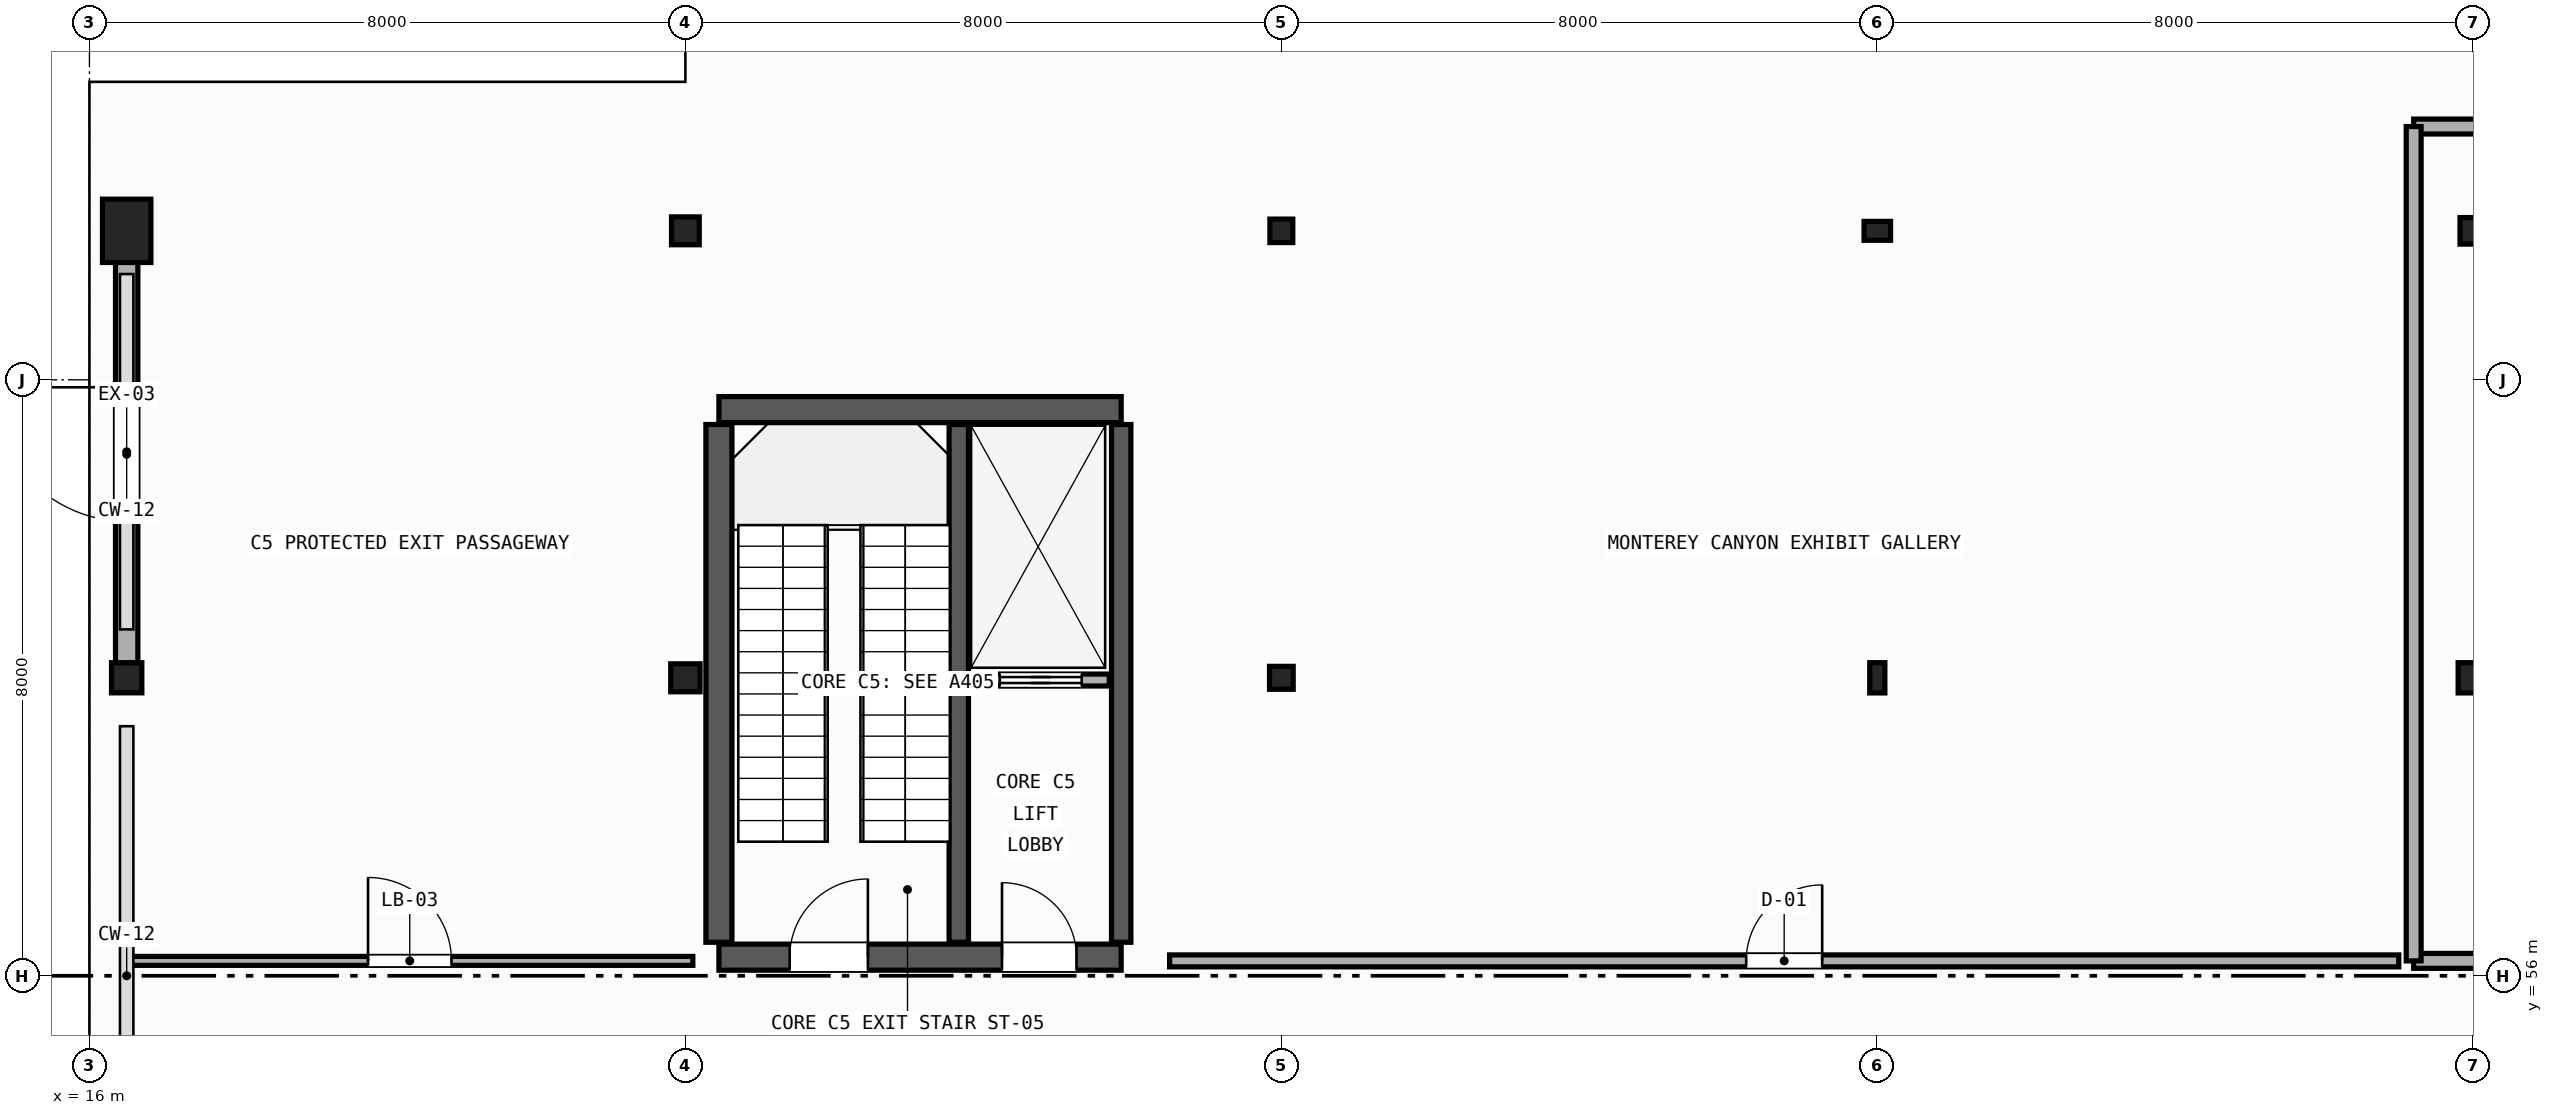
"""IFC4 building model, lengths in metres.
Left out: names, types, materials, properties, quantities, classifications, styles, units other than length and angle.
Written with IfcOpenShell. Run it as: python <this file> out.ifc"""

import sys

from ifc_helpers import new_model, si_unit, direction, frame, frame_2d, origin, origin_2d, place, context, subcontext, project, spatial, rectangle, hollow_rectangle, hollow_circle, i_section, extrude, element, fill, save


model = new_model("IFC4")
c1 = context("Model", 3, precision=1e-05, world=origin(), true_north=direction((0.0, 1.0)))
c2 = subcontext(c1, "Body", "Model", "MODEL_VIEW")
j1 = project(units=[si_unit("LENGTHUNIT", "METRE"), si_unit("PLANEANGLEUNIT", "RADIAN")], contexts=[c1])
p1 = place(None, origin())
s1 = spatial("IfcSite", under=j1, at=p1, CompositionType="ELEMENT")
p2 = place(p1, origin())
s2 = spatial("IfcBuilding", under=s1, at=p2, CompositionType="ELEMENT")
p3 = place(p2, origin())
s3 = spatial("IfcBuildingStorey", under=s2, at=p3, CompositionType="ELEMENT", Elevation=0.0)
p4 = place(p3, frame((16.5, 60.0, 0.0), z_axis=(0.0, 0.0, 1.0), x_axis=(0.0, 1.0, 0.0)))
e1 = element("IfcColumn", 1, at=p4, inside=s3, PredefinedType="COLUMN", context=c2, shape_type="SweptSolid", body=[
    extrude(i_section(OverallWidth=0.404, OverallDepth=0.407, WebThickness=0.027, FlangeThickness=0.044, FilletRadius=0.015, at=origin_2d()), origin(), (0.0, 0.0, 1.0), 5.12),
])
p5 = place(p3, frame((16.5, 66.0, 0.0), z_axis=(0.0, 0.0, 1.0), x_axis=(1.0, 0.0, 0.0)))
e2 = element("IfcColumn", 2, at=p5, inside=s3, PredefinedType="PILASTER", context=c2, shape_type="SweptSolid", body=[
    extrude(rectangle(XDim=0.65, YDim=0.85, at=origin_2d()), origin(), (0.0, 0.0, 1.0), 5.4),
])
p6 = place(p3, frame((24.0, 60.0, 0.0), z_axis=(0.0, 0.0, 1.0), x_axis=(1.0, 0.0, 0.0)))
e3 = element("IfcColumn", 3, at=p6, inside=s3, PredefinedType="COLUMN", context=c2, shape_type="SweptSolid", body=[
    extrude(i_section(OverallWidth=0.394, OverallDepth=0.376, WebThickness=0.017, FlangeThickness=0.028, FilletRadius=0.015, at=origin_2d()), origin(), (0.0, 0.0, 1.0), 5.12),
])
p7 = place(p3, frame((24.0, 66.0, 0.0), z_axis=(0.0, 0.0, 1.0), x_axis=(0.0, 1.0, 0.0)))
e4 = element("IfcColumn", 4, at=p7, inside=s3, PredefinedType="COLUMN", context=c2, shape_type="SweptSolid", body=[
    extrude(i_section(OverallWidth=0.374, OverallDepth=0.372, WebThickness=0.016, FlangeThickness=0.026, FilletRadius=0.015, at=origin_2d()), origin(), (0.0, 0.0, 1.0), 5.12),
])
p8 = place(p3, frame((32.0, 60.0, 0.0), z_axis=(0.0, 0.0, 1.0), x_axis=(0.0, 1.0, 0.0)))
e5 = element("IfcColumn", 5, at=p8, inside=s3, PredefinedType="COLUMN", context=c2, shape_type="SweptSolid", body=[
    extrude(i_section(OverallWidth=0.308, OverallDepth=0.318, WebThickness=0.013, FlangeThickness=0.021, FilletRadius=0.013, at=origin_2d()), origin(), (0.0, 0.0, 1.0), 5.12),
])
p9 = place(p3, frame((32.0, 66.0, 0.0), z_axis=(0.0, 0.0, 1.0), x_axis=(1.0, 0.0, 0.0)))
e6 = element("IfcColumn", 6, at=p9, inside=s3, PredefinedType="COLUMN", context=c2, shape_type="SweptSolid", body=[
    extrude(i_section(OverallWidth=0.307, OverallDepth=0.315, WebThickness=0.012, FlangeThickness=0.019, FilletRadius=0.013, at=origin_2d()), origin(), (0.0, 0.0, 1.0), 5.12),
])
p10 = place(p3, frame((40.0, 60.0, 0.0), z_axis=(0.0, 0.0, 1.0), x_axis=(1.0, 0.0, 0.0)))
e7 = element("IfcColumn", 7, at=p10, inside=s3, PredefinedType="COLUMN", context=c2, shape_type="SweptSolid", body=[
    extrude(hollow_rectangle(XDim=0.203, YDim=0.406, WallThickness=0.012, InnerFilletRadius=0.012, OuterFilletRadius=0.024, at=origin_2d()), origin(), (0.0, 0.0, 1.0), 5.12),
])
p11 = place(p3, frame((40.0, 66.0, 0.0), z_axis=(0.0, 0.0, 1.0), x_axis=(0.0, 1.0, 0.0)))
e8 = element("IfcColumn", 8, at=p11, inside=s3, PredefinedType="COLUMN", context=c2, shape_type="SweptSolid", body=[
    extrude(hollow_rectangle(XDim=0.254, YDim=0.356, WallThickness=0.012, InnerFilletRadius=0.012, OuterFilletRadius=0.024, at=origin_2d()), origin(), (0.0, 0.0, 1.0), 5.12),
])
p12 = place(p3, frame((48.0, 60.0, 0.0), z_axis=(0.0, 0.0, 1.0), x_axis=(0.0, 1.0, 0.0)))
e9 = element("IfcColumn", 9, at=p12, inside=s3, PredefinedType="COLUMN", context=c2, shape_type="SweptSolid", body=[
    extrude(hollow_circle(Radius=0.203, WallThickness=0.012, at=origin_2d()), origin(), (0.0, 0.0, 1.0), 5.12),
])
p13 = place(p3, frame((48.0, 66.0, 0.0), z_axis=(0.0, 0.0, 1.0), x_axis=(1.0, 0.0, 0.0)))
e10 = element("IfcColumn", 10, at=p13, inside=s3, PredefinedType="COLUMN", context=c2, shape_type="SweptSolid", body=[
    extrude(hollow_circle(Radius=0.178, WallThickness=0.012, at=origin_2d()), origin(), (0.0, 0.0, 1.0), 5.12),
])
p14 = place(p3, frame((16.5, 60.2, 0.0), z_axis=(0.0, 0.0, 1.0), x_axis=(0.0, 1.0, 0.0)))
e11 = element("IfcWall", 11, at=p14, inside=s3, PredefinedType="STANDARD", context=c2, shape_type="SweptSolid", body=[
    extrude(rectangle(XDim=5.6, YDim=0.3, at=frame_2d((2.8, 0.0))), origin(), (0.0, 0.0, 1.0), 4.28),
])
p15 = place(p14, frame((1.9, 0.0, 0.0)))
e12 = element("IfcOpeningElement", 12, at=p15, cuts=e11, PredefinedType="OPENING", context=c2, shape_type="SweptSolid", body=[
    extrude(rectangle(XDim=1.8, YDim=2.35, at=frame_2d((0.9, 1.175))), frame((0.0, 0.16, 0.0), z_axis=(0.0, -1.0, 0.0), x_axis=(1.0, 0.0, 0.0)), (0.0, 0.0, 1.0), 0.32),
])
p16 = place(p3, frame((24.45, 56.25, 0.0), z_axis=(0.0, 0.0, 1.0), x_axis=(1.0, 0.0, 0.0)))
e13 = element("IfcWall", 13, at=p16, inside=s3, PredefinedType="SHEAR", context=c2, shape_type="SweptSolid", body=[
    extrude(rectangle(XDim=5.4, YDim=0.35, at=frame_2d((2.7, 0.0))), origin(), (0.0, 0.0, 1.0), 5.11),
])
p17 = place(p16, frame((0.95, 0.0, 0.0)))
e14 = element("IfcOpeningElement", 14, at=p17, cuts=e13, PredefinedType="OPENING", context=c2, shape_type="SweptSolid", body=[
    extrude(rectangle(XDim=1.05, YDim=2.1, at=frame_2d((0.525, 1.05))), frame((0.0, 0.185, 0.0), z_axis=(0.0, -1.0, 0.0), x_axis=(1.0, 0.0, 0.0)), (0.0, 0.0, 1.0), 0.37),
])
p18 = place(p16, frame((3.8, 0.0, 0.0)))
e15 = element("IfcOpeningElement", 15, at=p18, cuts=e13, PredefinedType="OPENING", context=c2, shape_type="SweptSolid", body=[
    extrude(rectangle(XDim=1.0, YDim=2.15, at=frame_2d((0.5, 1.075))), frame((0.0, 0.185, 0.0), z_axis=(0.0, -1.0, 0.0), x_axis=(1.0, 0.0, 0.0)), (0.0, 0.0, 1.0), 0.37),
])
p19 = place(p3, frame((24.45, 63.6, 0.0), z_axis=(0.0, 0.0, 1.0), x_axis=(1.0, 0.0, 0.0)))
e16 = element("IfcWall", 16, at=p19, inside=s3, PredefinedType="SHEAR", context=c2, shape_type="SweptSolid", body=[
    extrude(rectangle(XDim=5.4, YDim=0.35, at=frame_2d((2.7, 0.0))), origin(), (0.0, 0.0, 1.0), 5.11),
])
p20 = place(p3, frame((24.45, 56.45, 0.0), z_axis=(0.0, 0.0, 1.0), x_axis=(0.0, 1.0, 0.0)))
e17 = element("IfcWall", 17, at=p20, inside=s3, PredefinedType="SHEAR", context=c2, shape_type="SweptSolid", body=[
    extrude(rectangle(XDim=6.95, YDim=0.35, at=frame_2d((3.475, 0.0))), origin(), (0.0, 0.0, 1.0), 5.11),
])
for number, where, z_axis, x_axis in (
    (18, (29.85, 56.45, 0.0), (0.0, 0.0, 1.0), (0.0, 1.0, 0.0)),
    (19, (27.67, 56.45, 0.0), (0.0, 0.0, 1.0), (0.0, 1.0, 0.0)),
):
    element("IfcWall", number, at=place(p3, frame(where, z_axis=z_axis, x_axis=x_axis)), inside=s3, PredefinedType="SHEAR", context=c2, shape_type="SweptSolid", body=[
        extrude(rectangle(XDim=6.95, YDim=0.26, at=frame_2d((3.475, 0.0))), origin(), (0.0, 0.0, 1.0), 5.11),
    ])
p21 = place(p3, frame((27.85, 59.97, 0.0), z_axis=(0.0, 0.0, 1.0), x_axis=(1.0, 0.0, 0.0)))
e20 = element("IfcWall", 20, at=p21, inside=s3, PredefinedType="PARTITIONING", context=c2, shape_type="SweptSolid", body=[
    extrude(rectangle(XDim=1.84, YDim=0.16, at=frame_2d((0.92, 0.0))), origin(), (0.0, 0.0, 1.0), 3.6),
])
p22 = place(p21, frame((0.37, 0.0, 0.0)))
e21 = element("IfcOpeningElement", 21, at=p22, cuts=e20, PredefinedType="OPENING", context=c2, shape_type="SweptSolid", body=[
    extrude(rectangle(XDim=1.1, YDim=2.15, at=frame_2d((0.55, 1.075))), frame((0.0, 0.09, 0.0), z_axis=(0.0, -1.0, 0.0), x_axis=(1.0, 0.0, 0.0)), (0.0, 0.0, 1.0), 0.18),
])
p23 = place(p3, frame((16.5, 56.2, 0.0), z_axis=(0.0, 0.0, 1.0), x_axis=(1.0, 0.0, 0.0)))
e22 = element("IfcWall", 22, at=p23, inside=s3, PredefinedType="PARTITIONING", context=c2, shape_type="SweptSolid", body=[
    extrude(rectangle(XDim=7.6, YDim=0.12, at=frame_2d((3.8, 0.0))), origin(), (0.0, 0.0, 1.0), 4.29),
])
p24 = place(p23, frame((3.24, 0.0, 0.0)))
e23 = element("IfcOpeningElement", 23, at=p24, cuts=e22, PredefinedType="OPENING", context=c2, shape_type="SweptSolid", body=[
    extrude(rectangle(XDim=1.12, YDim=2.15, at=frame_2d((0.56, 1.075))), frame((0.0, 0.07, 0.0), z_axis=(0.0, -1.0, 0.0), x_axis=(1.0, 0.0, 0.0)), (0.0, 0.0, 1.0), 0.14),
])
p25 = place(p3, frame((30.5, 56.2, 0.0), z_axis=(0.0, 0.0, 1.0), x_axis=(1.0, 0.0, 0.0)))
e24 = element("IfcWall", 24, at=p25, inside=s3, PredefinedType="PARTITIONING", context=c2, shape_type="SweptSolid", body=[
    extrude(rectangle(XDim=16.5, YDim=0.16, at=frame_2d((8.25, 0.0))), origin(), (0.0, 0.0, 1.0), 4.29),
])
p26 = place(p25, frame((7.74, 0.0, 0.0)))
e25 = element("IfcOpeningElement", 25, at=p26, cuts=e24, PredefinedType="OPENING", context=c2, shape_type="SweptSolid", body=[
    extrude(rectangle(XDim=1.02, YDim=2.15, at=frame_2d((0.51, 1.075))), frame((0.0, 0.09, 0.0), z_axis=(0.0, -1.0, 0.0), x_axis=(1.0, 0.0, 0.0)), (0.0, 0.0, 1.0), 0.18),
])
p27 = place(p3, frame((47.2, 56.2, 0.0), z_axis=(0.0, 0.0, 1.0), x_axis=(1.0, 0.0, 0.0)))
e26 = element("IfcWall", 26, at=p27, inside=s3, PredefinedType="PLUMBINGWALL", context=c2, shape_type="SweptSolid", body=[
    extrude(rectangle(XDim=7.8, YDim=0.2, at=frame_2d((3.9, 0.0))), origin(), (0.0, 0.0, 1.0), 4.29),
])
p28 = place(p27, frame((3.445, 0.0, 0.0)))
e27 = element("IfcOpeningElement", 27, at=p28, cuts=e26, PredefinedType="OPENING", context=c2, shape_type="SweptSolid", body=[
    extrude(rectangle(XDim=0.91, YDim=2.1, at=frame_2d((0.455, 1.05))), frame((0.0, 0.11, 0.0), z_axis=(0.0, -1.0, 0.0), x_axis=(1.0, 0.0, 0.0)), (0.0, 0.0, 1.0), 0.22),
])
p29 = place(p3, frame((47.2, 67.4, 0.0), z_axis=(0.0, 0.0, 1.0), x_axis=(1.0, 0.0, 0.0)))
e28 = element("IfcWall", 28, at=p29, inside=s3, PredefinedType="PLUMBINGWALL", context=c2, shape_type="SweptSolid", body=[
    extrude(rectangle(XDim=7.8, YDim=0.2, at=frame_2d((3.9, 0.0))), origin(), (0.0, 0.0, 1.0), 4.29),
])
p30 = place(p3, frame((47.2, 56.2, 0.0), z_axis=(0.0, 0.0, 1.0), x_axis=(0.0, 1.0, 0.0)))
e29 = element("IfcWall", 29, at=p30, inside=s3, PredefinedType="PLUMBINGWALL", context=c2, shape_type="SweptSolid", body=[
    extrude(rectangle(XDim=11.2, YDim=0.2, at=frame_2d((5.6, 0.0))), origin(), (0.0, 0.0, 1.0), 4.29),
])
p31 = place(p15, origin())
e30 = element("IfcDoor", 30, at=p31, inside=s3, OperationType="SINGLE_SWING_RIGHT", PredefinedType="DOOR", context=c2, shape_type="SweptSolid", body=[
    extrude(rectangle(XDim=1.8, YDim=2.35, at=frame_2d((0.9, 1.175))), frame((0.0, 0.025, 0.0), z_axis=(0.0, -1.0, 0.0), x_axis=(1.0, 0.0, 0.0)), (0.0, 0.0, 1.0), 0.05),
])
fill(e12, e30)
p32 = place(p22, origin())
e31 = element("IfcDoor", 31, at=p32, inside=s3, OperationType="SLIDING_TO_LEFT", PredefinedType="DOOR", context=c2, shape_type="SweptSolid", body=[
    extrude(rectangle(XDim=1.1, YDim=2.15, at=frame_2d((0.55, 1.075))), frame((0.0, 0.025, 0.0), z_axis=(0.0, -1.0, 0.0), x_axis=(1.0, 0.0, 0.0)), (0.0, 0.0, 1.0), 0.05),
])
fill(e21, e31)
p33 = place(p17, origin())
e32 = element("IfcDoor", 32, at=p33, inside=s3, OperationType="SINGLE_SWING_RIGHT", PredefinedType="DOOR", context=c2, shape_type="SweptSolid", body=[
    extrude(rectangle(XDim=1.05, YDim=2.1, at=frame_2d((0.525, 1.05))), frame((0.0, 0.025, 0.0), z_axis=(0.0, -1.0, 0.0), x_axis=(1.0, 0.0, 0.0)), (0.0, 0.0, 1.0), 0.05),
])
fill(e14, e32)
p34 = place(p18, origin())
e33 = element("IfcDoor", 33, at=p34, inside=s3, OperationType="SINGLE_SWING_LEFT", PredefinedType="DOOR", context=c2, shape_type="SweptSolid", body=[
    extrude(rectangle(XDim=1.0, YDim=2.15, at=frame_2d((0.5, 1.075))), frame((0.0, 0.025, 0.0), z_axis=(0.0, -1.0, 0.0), x_axis=(1.0, 0.0, 0.0)), (0.0, 0.0, 1.0), 0.05),
])
fill(e15, e33)
p35 = place(p24, origin())
e34 = element("IfcDoor", 34, at=p35, inside=s3, OperationType="SINGLE_SWING_LEFT", PredefinedType="DOOR", context=c2, shape_type="SweptSolid", body=[
    extrude(rectangle(XDim=1.12, YDim=2.15, at=frame_2d((0.56, 1.075))), frame((0.0, 0.025, 0.0), z_axis=(0.0, -1.0, 0.0), x_axis=(1.0, 0.0, 0.0)), (0.0, 0.0, 1.0), 0.05),
])
fill(e23, e34)
p36 = place(p26, origin())
e35 = element("IfcDoor", 35, at=p36, inside=s3, OperationType="SINGLE_SWING_RIGHT", PredefinedType="DOOR", context=c2, shape_type="SweptSolid", body=[
    extrude(rectangle(XDim=1.02, YDim=2.15, at=frame_2d((0.51, 1.075))), frame((0.0, 0.025, 0.0), z_axis=(0.0, -1.0, 0.0), x_axis=(1.0, 0.0, 0.0)), (0.0, 0.0, 1.0), 0.05),
])
fill(e25, e35)
save(model, sys.argv[1])
